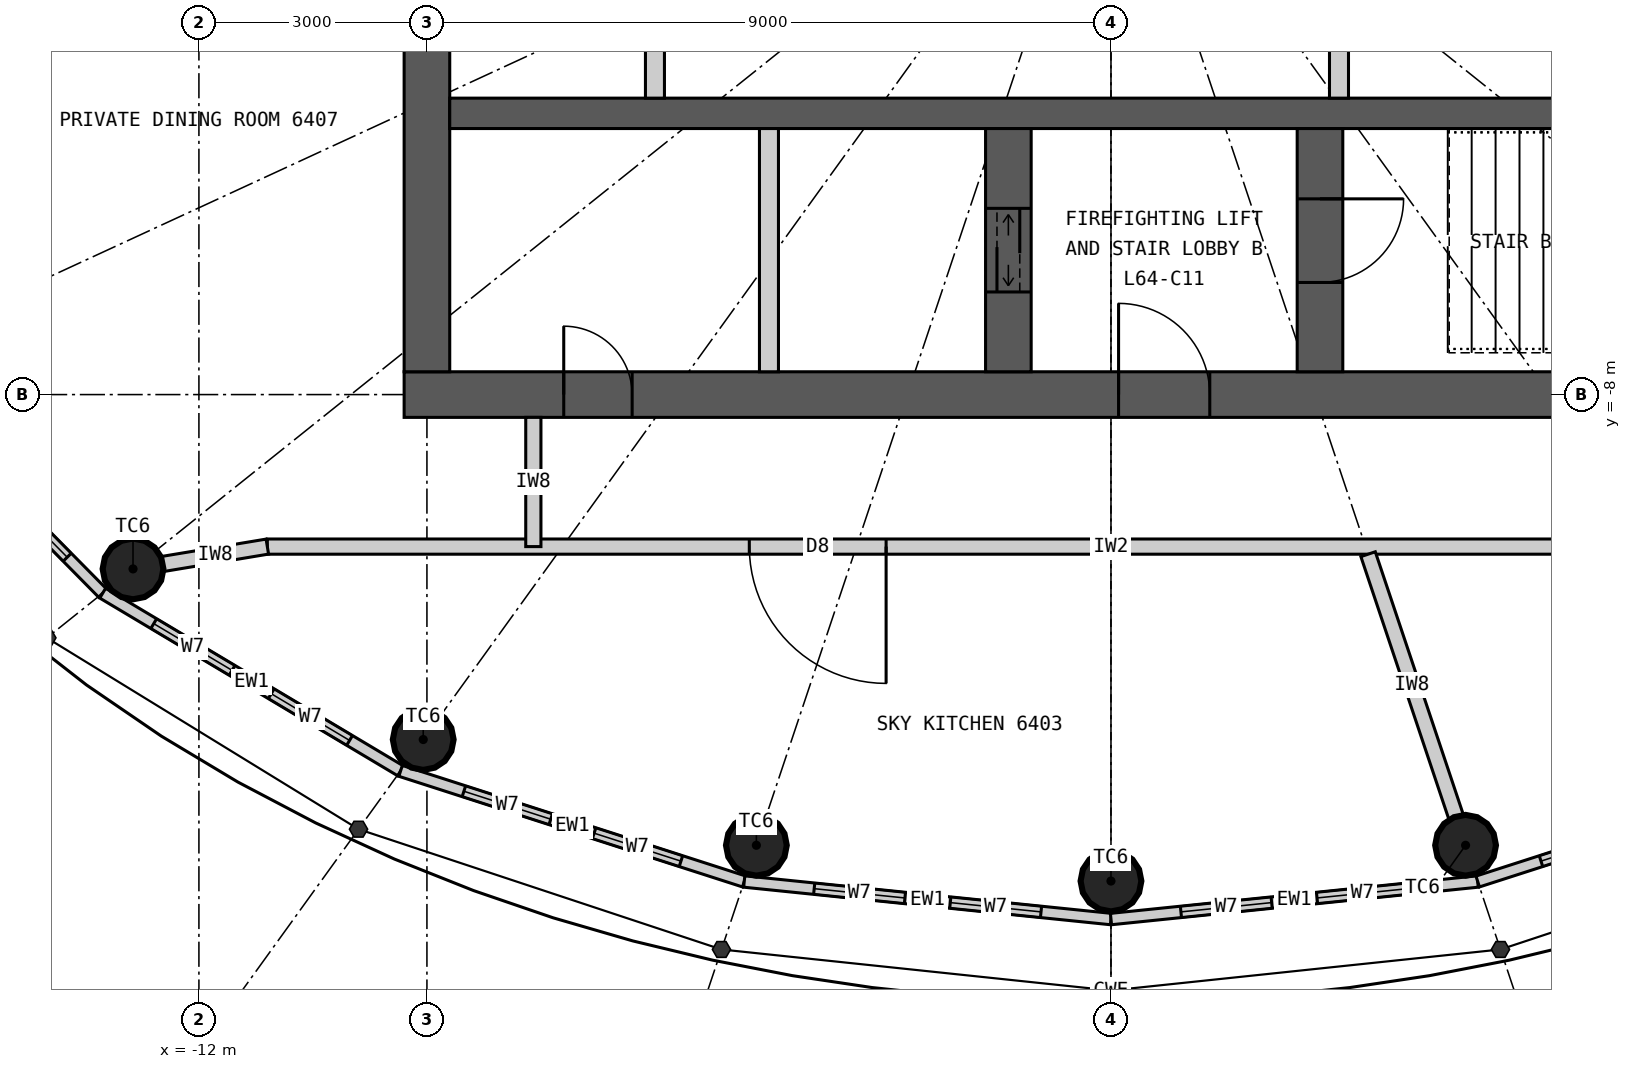
"""IFC4 building model, lengths in metres.
Left out: names, types, materials, properties, quantities, classifications, styles, units other than length and angle.
Written with IfcOpenShell. Run it as: python <this file> out.ifc"""

import sys

from ifc_helpers import new_model, si_unit, direction, frame, frame_2d, origin, origin_2d, place, context, subcontext, project, spatial, rectangle, circle, extrude, element, fill, save


model = new_model("IFC4")
c1 = context("Model", 3, precision=1e-05, world=origin(), true_north=direction((0.0, 1.0)))
c2 = subcontext(c1, "Body", "Model", "MODEL_VIEW")
j1 = project(units=[si_unit("LENGTHUNIT", "METRE"), si_unit("PLANEANGLEUNIT", "RADIAN")], contexts=[c1])
p1 = place(None, origin())
s1 = spatial("IfcSite", under=j1, at=p1, CompositionType="ELEMENT")
p2 = place(p1, origin())
s2 = spatial("IfcBuilding", under=s1, at=p2, CompositionType="ELEMENT")
p3 = place(p2, frame((0.0, 0.0, 237.3)))
s3 = spatial("IfcBuildingStorey", under=s2, at=p3, CompositionType="ELEMENT", Elevation=237.3)
for number, where, z_axis, x_axis in (
    (1, (-12.867, -10.294, 0.0), (0.0, 0.0, 1.0), (1.0, 0.0, 0.0)),
    (2, (-9.049, -12.538, 0.0), (0.0, 0.0, 1.0), (1.0, 0.0, 0.0)),
    (3, (-4.666, -13.929, 0.0), (0.0, 0.0, 1.0), (1.0, 0.0, 0.0)),
    (4, (0.0, -14.4, 0.0), (0.0, 0.0, 1.0), (1.0, 0.0, 0.0)),
    (5, (4.666, -13.929, 0.0), (0.0, 0.0, 1.0), (1.0, 0.0, 0.0)),
):
    element("IfcColumn", number, at=place(p3, frame(where, z_axis=z_axis, x_axis=x_axis)), inside=s3, PredefinedType="COLUMN", context=c2, shape_type="SweptSolid", body=[
        extrude(circle(Radius=0.4, at=origin_2d()), origin(), (0.0, 0.0, 1.0), 5.4),
    ])
p4 = place(p3, frame((9.3, -8.0, 0.0), z_axis=(0.0, 0.0, 1.0), x_axis=(-1.0, 0.0, 0.0)))
e6 = element("IfcWall", 6, at=p4, inside=s3, PredefinedType="SHEAR", context=c2, shape_type="SweptSolid", body=[
    extrude(rectangle(XDim=18.6, YDim=0.6, at=frame_2d((9.3, 0.0))), origin(), (0.0, 0.0, 1.0), 5.4),
])
p5 = place(p4, frame((8.0, 0.0, 0.0)))
e7 = element("IfcOpeningElement", 7, at=p5, cuts=e6, PredefinedType="OPENING", context=c2, shape_type="SweptSolid", body=[
    extrude(rectangle(XDim=1.2, YDim=2.2, at=frame_2d((0.6, 1.1))), frame((0.0, 0.31, 0.0), z_axis=(0.0, -1.0, 0.0), x_axis=(1.0, 0.0, 0.0)), (0.0, 0.0, 1.0), 0.62),
])
p6 = place(p4, frame((15.6, 0.0, 0.0)))
e8 = element("IfcOpeningElement", 8, at=p6, cuts=e6, PredefinedType="OPENING", context=c2, shape_type="SweptSolid", body=[
    extrude(rectangle(XDim=0.9, YDim=2.2, at=frame_2d((0.45, 1.1))), frame((0.0, 0.31, 0.0), z_axis=(0.0, -1.0, 0.0), x_axis=(1.0, 0.0, 0.0)), (0.0, 0.0, 1.0), 0.62),
])
p7 = place(p3, frame((-9.0, 7.7, 0.0), z_axis=(0.0, 0.0, 1.0), x_axis=(0.0, -1.0, 0.0)))
e9 = element("IfcWall", 9, at=p7, inside=s3, PredefinedType="SHEAR", context=c2, shape_type="SweptSolid", body=[
    extrude(rectangle(XDim=15.4, YDim=0.6, at=frame_2d((7.7, 0.0))), origin(), (0.0, 0.0, 1.0), 5.4),
])
p8 = place(p7, frame((6.8, 0.0, 0.0)))
e10 = element("IfcOpeningElement", 10, at=p8, cuts=e9, PredefinedType="OPENING", context=c2, shape_type="SweptSolid", body=[
    extrude(rectangle(XDim=1.8, YDim=2.2, at=frame_2d((0.9, 1.1))), frame((0.0, 0.31, 0.0), z_axis=(0.0, -1.0, 0.0), x_axis=(1.0, 0.0, 0.0)), (0.0, 0.0, 1.0), 0.62),
])
p9 = place(p3, frame((-8.7, -4.3, 0.0), z_axis=(0.0, 0.0, 1.0), x_axis=(1.0, 0.0, 0.0)))
e11 = element("IfcWall", 11, at=p9, inside=s3, PredefinedType="SHEAR", context=c2, shape_type="SweptSolid", body=[
    extrude(rectangle(XDim=17.4, YDim=0.4, at=frame_2d((8.7, 0.0))), origin(), (0.0, 0.0, 1.0), 5.4),
])
p10 = place(p3, frame((2.75, -7.7, 0.0), z_axis=(0.0, 0.0, 1.0), x_axis=(0.0, 1.0, 0.0)))
e12 = element("IfcWall", 12, at=p10, inside=s3, PredefinedType="SHEAR", context=c2, shape_type="SweptSolid", body=[
    extrude(rectangle(XDim=3.2, YDim=0.6, at=frame_2d((1.6, 0.0))), origin(), (0.0, 0.0, 1.0), 5.4),
])
p11 = place(p10, frame((1.175, 0.0, 0.0)))
e13 = element("IfcOpeningElement", 13, at=p11, cuts=e12, PredefinedType="OPENING", context=c2, shape_type="SweptSolid", body=[
    extrude(rectangle(XDim=1.1, YDim=2.2, at=frame_2d((0.55, 1.1))), frame((0.0, 0.31, 0.0), z_axis=(0.0, -1.0, 0.0), x_axis=(1.0, 0.0, 0.0)), (0.0, 0.0, 1.0), 0.62),
])
p12 = place(p3, frame((-1.35, -7.7, 0.0), z_axis=(0.0, 0.0, 1.0), x_axis=(0.0, 1.0, 0.0)))
e14 = element("IfcWall", 14, at=p12, inside=s3, PredefinedType="SHEAR", context=c2, shape_type="SweptSolid", body=[
    extrude(rectangle(XDim=3.2, YDim=0.6, at=frame_2d((1.6, 0.0))), origin(), (0.0, 0.0, 1.0), 5.4),
])
p13 = place(p12, frame((1.05, 0.0, 0.0)))
e15 = element("IfcOpeningElement", 15, at=p13, cuts=e14, PredefinedType="OPENING", context=c2, shape_type="SweptSolid", body=[
    extrude(rectangle(XDim=1.1, YDim=2.2, at=frame_2d((0.55, 1.1))), frame((0.0, 0.31, 0.0), z_axis=(0.0, -1.0, 0.0), x_axis=(1.0, 0.0, 0.0)), (0.0, 0.0, 1.0), 0.62),
])
p14 = place(p3, frame((-4.5, -7.7, 0.0), z_axis=(0.0, 0.0, 1.0), x_axis=(0.0, 1.0, 0.0)))
e16 = element("IfcWall", 16, at=p14, inside=s3, PredefinedType="PARTITIONING", context=c2, shape_type="SweptSolid", body=[
    extrude(rectangle(XDim=3.2, YDim=0.25, at=frame_2d((1.6, 0.0))), origin(), (0.0, 0.0, 1.0), 5.4),
])
for number, where, z_axis, x_axis in (
    (17, (-6.0, -4.1, 0.0), (0.0, 0.0, 1.0), (0.0, 1.0, 0.0)),
    (18, (3.0, -4.1, 0.0), (0.0, 0.0, 1.0), (0.0, 1.0, 0.0)),
):
    element("IfcWall", number, at=place(p3, frame(where, z_axis=z_axis, x_axis=x_axis)), inside=s3, PredefinedType="PARTITIONING", context=c2, shape_type="SweptSolid", body=[
        extrude(rectangle(XDim=2.35, YDim=0.25, at=frame_2d((1.175, 0.0))), origin(), (0.0, 0.0, 1.0), 5.4),
    ])
p15 = place(p3, frame((-16.307, -7.532, 0.0), z_axis=(0.0, 0.0, 1.0), x_axis=(0.702523956258, -0.711660095048, 0.0)))
e19 = element("IfcWall", 19, at=p15, inside=s3, PredefinedType="ELEMENTEDWALL", context=c2, shape_type="SweptSolid", body=[
    extrude(rectangle(XDim=4.329, YDim=0.15, at=frame_2d((2.165, 0.0))), origin(), (0.0, 0.0, 1.0), 5.15),
])
p16 = place(p15, frame((0.665, 0.0, 0.5)))
e20 = element("IfcOpeningElement", 20, at=p16, cuts=e19, PredefinedType="OPENING", context=c2, shape_type="SweptSolid", body=[
    extrude(rectangle(XDim=1.2, YDim=3.6, at=frame_2d((0.6, 1.8))), frame((0.0, 0.085, 0.0), z_axis=(0.0, -1.0, 0.0), x_axis=(1.0, 0.0, 0.0)), (0.0, 0.0, 1.0), 0.17),
])
p17 = place(p15, frame((2.465, 0.0, 0.5)))
e21 = element("IfcOpeningElement", 21, at=p17, cuts=e19, PredefinedType="OPENING", context=c2, shape_type="SweptSolid", body=[
    extrude(rectangle(XDim=1.2, YDim=3.6, at=frame_2d((0.6, 1.8))), frame((0.0, 0.085, 0.0), z_axis=(0.0, -1.0, 0.0), x_axis=(1.0, 0.0, 0.0)), (0.0, 0.0, 1.0), 0.17),
])
p18 = place(p3, frame((-13.266, -10.613, 0.0), z_axis=(0.0, 0.0, 1.0), x_axis=(0.858849230109, -0.512228464594, 0.0)))
e22 = element("IfcWall", 22, at=p18, inside=s3, PredefinedType="ELEMENTEDWALL", context=c2, shape_type="SweptSolid", body=[
    extrude(rectangle(XDim=4.564, YDim=0.15, at=frame_2d((2.282, 0.0))), origin(), (0.0, 0.0, 1.0), 5.15),
])
p19 = place(p18, frame((0.782, 0.0, 0.5)))
e23 = element("IfcOpeningElement", 23, at=p19, cuts=e22, PredefinedType="OPENING", context=c2, shape_type="SweptSolid", body=[
    extrude(rectangle(XDim=1.2, YDim=3.6, at=frame_2d((0.6, 1.8))), frame((0.0, 0.085, 0.0), z_axis=(0.0, -1.0, 0.0), x_axis=(1.0, 0.0, 0.0)), (0.0, 0.0, 1.0), 0.17),
])
p20 = place(p18, frame((2.582, 0.0, 0.5)))
e24 = element("IfcOpeningElement", 24, at=p20, cuts=e22, PredefinedType="OPENING", context=c2, shape_type="SweptSolid", body=[
    extrude(rectangle(XDim=1.2, YDim=3.6, at=frame_2d((0.6, 1.8))), frame((0.0, 0.085, 0.0), z_axis=(0.0, -1.0, 0.0), x_axis=(1.0, 0.0, 0.0)), (0.0, 0.0, 1.0), 0.17),
])
p21 = place(p3, frame((-9.346, -12.951, 0.0), z_axis=(0.0, 0.0, 1.0), x_axis=(0.951881908824, -0.306465057804, 0.0)))
e25 = element("IfcWall", 25, at=p21, inside=s3, PredefinedType="ELEMENTEDWALL", context=c2, shape_type="SweptSolid", body=[
    extrude(rectangle(XDim=4.75, YDim=0.15, at=frame_2d((2.375, 0.0))), origin(), (0.0, 0.0, 1.0), 5.15),
])
p22 = place(p21, frame((0.875, 0.0, 0.5)))
e26 = element("IfcOpeningElement", 26, at=p22, cuts=e25, PredefinedType="OPENING", context=c2, shape_type="SweptSolid", body=[
    extrude(rectangle(XDim=1.2, YDim=3.6, at=frame_2d((0.6, 1.8))), frame((0.0, 0.085, 0.0), z_axis=(0.0, -1.0, 0.0), x_axis=(1.0, 0.0, 0.0)), (0.0, 0.0, 1.0), 0.17),
])
p23 = place(p21, frame((2.675, 0.0, 0.5)))
e27 = element("IfcOpeningElement", 27, at=p23, cuts=e25, PredefinedType="OPENING", context=c2, shape_type="SweptSolid", body=[
    extrude(rectangle(XDim=1.2, YDim=3.6, at=frame_2d((0.6, 1.8))), frame((0.0, 0.085, 0.0), z_axis=(0.0, -1.0, 0.0), x_axis=(1.0, 0.0, 0.0)), (0.0, 0.0, 1.0), 0.17),
])
p24 = place(p3, frame((-4.825, -14.406, 0.0), z_axis=(0.0, 0.0, 1.0), x_axis=(0.994807343212, -0.10177597895, 0.0)))
e28 = element("IfcWall", 28, at=p24, inside=s3, PredefinedType="ELEMENTEDWALL", context=c2, shape_type="SweptSolid", body=[
    extrude(rectangle(XDim=4.85, YDim=0.15, at=frame_2d((2.425, 0.0))), origin(), (0.0, 0.0, 1.0), 5.15),
])
p25 = place(p24, frame((0.925, 0.0, 0.5)))
e29 = element("IfcOpeningElement", 29, at=p25, cuts=e28, PredefinedType="OPENING", context=c2, shape_type="SweptSolid", body=[
    extrude(rectangle(XDim=1.2, YDim=3.6, at=frame_2d((0.6, 1.8))), frame((0.0, 0.085, 0.0), z_axis=(0.0, -1.0, 0.0), x_axis=(1.0, 0.0, 0.0)), (0.0, 0.0, 1.0), 0.17),
])
p26 = place(p24, frame((2.725, 0.0, 0.5)))
e30 = element("IfcOpeningElement", 30, at=p26, cuts=e28, PredefinedType="OPENING", context=c2, shape_type="SweptSolid", body=[
    extrude(rectangle(XDim=1.2, YDim=3.6, at=frame_2d((0.6, 1.8))), frame((0.0, 0.085, 0.0), z_axis=(0.0, -1.0, 0.0), x_axis=(1.0, 0.0, 0.0)), (0.0, 0.0, 1.0), 0.17),
])
p27 = place(p3, frame((0.0, -14.9, 0.0), z_axis=(0.0, 0.0, 1.0), x_axis=(0.994807343212, 0.10177597895, 0.0)))
e31 = element("IfcWall", 31, at=p27, inside=s3, PredefinedType="ELEMENTEDWALL", context=c2, shape_type="SweptSolid", body=[
    extrude(rectangle(XDim=4.85, YDim=0.15, at=frame_2d((2.425, 0.0))), origin(), (0.0, 0.0, 1.0), 5.15),
])
p28 = place(p27, frame((0.925, 0.0, 0.5)))
e32 = element("IfcOpeningElement", 32, at=p28, cuts=e31, PredefinedType="OPENING", context=c2, shape_type="SweptSolid", body=[
    extrude(rectangle(XDim=1.2, YDim=3.6, at=frame_2d((0.6, 1.8))), frame((0.0, 0.085, 0.0), z_axis=(0.0, -1.0, 0.0), x_axis=(1.0, 0.0, 0.0)), (0.0, 0.0, 1.0), 0.17),
])
p29 = place(p27, frame((2.725, 0.0, 0.5)))
e33 = element("IfcOpeningElement", 33, at=p29, cuts=e31, PredefinedType="OPENING", context=c2, shape_type="SweptSolid", body=[
    extrude(rectangle(XDim=1.2, YDim=3.6, at=frame_2d((0.6, 1.8))), frame((0.0, 0.085, 0.0), z_axis=(0.0, -1.0, 0.0), x_axis=(1.0, 0.0, 0.0)), (0.0, 0.0, 1.0), 0.17),
])
p30 = place(p3, frame((4.825, -14.406, 0.0), z_axis=(0.0, 0.0, 1.0), x_axis=(0.951881908824, 0.306465057804, 0.0)))
e34 = element("IfcWall", 34, at=p30, inside=s3, PredefinedType="ELEMENTEDWALL", context=c2, shape_type="SweptSolid", body=[
    extrude(rectangle(XDim=4.75, YDim=0.15, at=frame_2d((2.375, 0.0))), origin(), (0.0, 0.0, 1.0), 5.15),
])
p31 = place(p30, frame((0.875, 0.0, 0.5)))
e35 = element("IfcOpeningElement", 35, at=p31, cuts=e34, PredefinedType="OPENING", context=c2, shape_type="SweptSolid", body=[
    extrude(rectangle(XDim=1.2, YDim=3.6, at=frame_2d((0.6, 1.8))), frame((0.0, 0.085, 0.0), z_axis=(0.0, -1.0, 0.0), x_axis=(1.0, 0.0, 0.0)), (0.0, 0.0, 1.0), 0.17),
])
p32 = place(p30, frame((2.675, 0.0, 0.5)))
e36 = element("IfcOpeningElement", 36, at=p32, cuts=e34, PredefinedType="OPENING", context=c2, shape_type="SweptSolid", body=[
    extrude(rectangle(XDim=1.2, YDim=3.6, at=frame_2d((0.6, 1.8))), frame((0.0, 0.085, 0.0), z_axis=(0.0, -1.0, 0.0), x_axis=(1.0, 0.0, 0.0)), (0.0, 0.0, 1.0), 0.17),
])
p33 = place(p3, frame((11.1, -10.0, 0.0), z_axis=(0.0, 0.0, 1.0), x_axis=(-1.0, 0.0, 0.0)))
e37 = element("IfcWall", 37, at=p33, inside=s3, PredefinedType="PARTITIONING", context=c2, shape_type="SweptSolid", body=[
    extrude(rectangle(XDim=22.2, YDim=0.2, at=frame_2d((11.1, 0.0))), origin(), (0.0, 0.0, 1.0), 5.15),
])
p34 = place(p33, frame((14.059, 0.0, 0.0)))
e38 = element("IfcOpeningElement", 38, at=p34, cuts=e37, PredefinedType="OPENING", context=c2, shape_type="SweptSolid", body=[
    extrude(rectangle(XDim=1.8, YDim=2.4, at=frame_2d((0.9, 1.2))), frame((0.0, 0.11, 0.0), z_axis=(0.0, -1.0, 0.0), x_axis=(1.0, 0.0, 0.0)), (0.0, 0.0, 1.0), 0.22),
])
p35 = place(p3, frame((3.383, -10.1, 0.0), z_axis=(0.0, 0.0, 1.0), x_axis=(0.317596328658, -0.948226013155, 0.0)))
e39 = element("IfcWall", 39, at=p35, inside=s3, PredefinedType="PARTITIONING", context=c2, shape_type="SweptSolid", body=[
    extrude(rectangle(XDim=3.638, YDim=0.2, at=frame_2d((1.819, 0.0))), origin(), (0.0, 0.0, 1.0), 4.3),
])
p36 = place(p3, frame((-7.6, -8.3, 0.0), z_axis=(0.0, 0.0, 1.0), x_axis=(0.0, -1.0, 0.0)))
e40 = element("IfcWall", 40, at=p36, inside=s3, PredefinedType="PARTITIONING", context=c2, shape_type="SweptSolid", body=[
    extrude(rectangle(XDim=1.7, YDim=0.2, at=frame_2d((0.85, 0.0))), origin(), (0.0, 0.0, 1.0), 5.15),
])
p37 = place(p3, frame((-11.1, -10.0, 0.0), z_axis=(0.0, 0.0, 1.0), x_axis=(-0.986474439415, -0.163915162144, 0.0)))
e41 = element("IfcWall", 41, at=p37, inside=s3, PredefinedType="PARTITIONING", context=c2, shape_type="SweptSolid", body=[
    extrude(rectangle(XDim=1.391, YDim=0.2, at=frame_2d((0.696, 0.0))), origin(), (0.0, 0.0, 1.0), 4.3),
])
p38 = place(p17, origin())
e42 = element("IfcWindow", 42, at=p38, inside=s3, PartitioningType="SINGLE_PANEL", PredefinedType="WINDOW", context=c2, shape_type="SweptSolid", body=[
    extrude(rectangle(XDim=1.2, YDim=3.6, at=frame_2d((0.6, 1.8))), frame((0.0, 0.03, 0.0), z_axis=(0.0, -1.0, 0.0), x_axis=(1.0, 0.0, 0.0)), (0.0, 0.0, 1.0), 0.06),
])
fill(e21, e42)
p39 = place(p19, origin())
e43 = element("IfcWindow", 43, at=p39, inside=s3, PartitioningType="SINGLE_PANEL", PredefinedType="WINDOW", context=c2, shape_type="SweptSolid", body=[
    extrude(rectangle(XDim=1.2, YDim=3.6, at=frame_2d((0.6, 1.8))), frame((0.0, 0.03, 0.0), z_axis=(0.0, -1.0, 0.0), x_axis=(1.0, 0.0, 0.0)), (0.0, 0.0, 1.0), 0.06),
])
fill(e23, e43)
p40 = place(p20, origin())
e44 = element("IfcWindow", 44, at=p40, inside=s3, PartitioningType="SINGLE_PANEL", PredefinedType="WINDOW", context=c2, shape_type="SweptSolid", body=[
    extrude(rectangle(XDim=1.2, YDim=3.6, at=frame_2d((0.6, 1.8))), frame((0.0, 0.03, 0.0), z_axis=(0.0, -1.0, 0.0), x_axis=(1.0, 0.0, 0.0)), (0.0, 0.0, 1.0), 0.06),
])
fill(e24, e44)
p41 = place(p22, origin())
e45 = element("IfcWindow", 45, at=p41, inside=s3, PartitioningType="SINGLE_PANEL", PredefinedType="WINDOW", context=c2, shape_type="SweptSolid", body=[
    extrude(rectangle(XDim=1.2, YDim=3.6, at=frame_2d((0.6, 1.8))), frame((0.0, 0.03, 0.0), z_axis=(0.0, -1.0, 0.0), x_axis=(1.0, 0.0, 0.0)), (0.0, 0.0, 1.0), 0.06),
])
fill(e26, e45)
p42 = place(p23, origin())
e46 = element("IfcWindow", 46, at=p42, inside=s3, PartitioningType="SINGLE_PANEL", PredefinedType="WINDOW", context=c2, shape_type="SweptSolid", body=[
    extrude(rectangle(XDim=1.2, YDim=3.6, at=frame_2d((0.6, 1.8))), frame((0.0, 0.03, 0.0), z_axis=(0.0, -1.0, 0.0), x_axis=(1.0, 0.0, 0.0)), (0.0, 0.0, 1.0), 0.06),
])
fill(e27, e46)
p43 = place(p25, origin())
e47 = element("IfcWindow", 47, at=p43, inside=s3, PartitioningType="SINGLE_PANEL", PredefinedType="WINDOW", context=c2, shape_type="SweptSolid", body=[
    extrude(rectangle(XDim=1.2, YDim=3.6, at=frame_2d((0.6, 1.8))), frame((0.0, 0.03, 0.0), z_axis=(0.0, -1.0, 0.0), x_axis=(1.0, 0.0, 0.0)), (0.0, 0.0, 1.0), 0.06),
])
fill(e29, e47)
p44 = place(p26, origin())
e48 = element("IfcWindow", 48, at=p44, inside=s3, PartitioningType="SINGLE_PANEL", PredefinedType="WINDOW", context=c2, shape_type="SweptSolid", body=[
    extrude(rectangle(XDim=1.2, YDim=3.6, at=frame_2d((0.6, 1.8))), frame((0.0, 0.03, 0.0), z_axis=(0.0, -1.0, 0.0), x_axis=(1.0, 0.0, 0.0)), (0.0, 0.0, 1.0), 0.06),
])
fill(e30, e48)
p45 = place(p28, origin())
e49 = element("IfcWindow", 49, at=p45, inside=s3, PartitioningType="SINGLE_PANEL", PredefinedType="WINDOW", context=c2, shape_type="SweptSolid", body=[
    extrude(rectangle(XDim=1.2, YDim=3.6, at=frame_2d((0.6, 1.8))), frame((0.0, 0.03, 0.0), z_axis=(0.0, -1.0, 0.0), x_axis=(1.0, 0.0, 0.0)), (0.0, 0.0, 1.0), 0.06),
])
fill(e32, e49)
p46 = place(p29, origin())
e50 = element("IfcWindow", 50, at=p46, inside=s3, PartitioningType="SINGLE_PANEL", PredefinedType="WINDOW", context=c2, shape_type="SweptSolid", body=[
    extrude(rectangle(XDim=1.2, YDim=3.6, at=frame_2d((0.6, 1.8))), frame((0.0, 0.03, 0.0), z_axis=(0.0, -1.0, 0.0), x_axis=(1.0, 0.0, 0.0)), (0.0, 0.0, 1.0), 0.06),
])
fill(e33, e50)
p47 = place(p31, origin())
e51 = element("IfcWindow", 51, at=p47, inside=s3, PartitioningType="SINGLE_PANEL", PredefinedType="WINDOW", context=c2, shape_type="SweptSolid", body=[
    extrude(rectangle(XDim=1.2, YDim=3.6, at=frame_2d((0.6, 1.8))), frame((0.0, 0.03, 0.0), z_axis=(0.0, -1.0, 0.0), x_axis=(1.0, 0.0, 0.0)), (0.0, 0.0, 1.0), 0.06),
])
fill(e35, e51)
p48 = place(p34, origin())
e52 = element("IfcDoor", 52, at=p48, inside=s3, OperationType="DOUBLE_DOOR_DOUBLE_SWING", PredefinedType="DOOR", context=c2, shape_type="SweptSolid", body=[
    extrude(rectangle(XDim=1.8, YDim=2.4, at=frame_2d((0.9, 1.2))), frame((0.0, 0.025, 0.0), z_axis=(0.0, -1.0, 0.0), x_axis=(1.0, 0.0, 0.0)), (0.0, 0.0, 1.0), 0.05),
])
fill(e38, e52)
p49 = place(p5, origin())
e53 = element("IfcDoor", 53, at=p49, inside=s3, OperationType="SINGLE_SWING_RIGHT", PredefinedType="DOOR", context=c2, shape_type="SweptSolid", body=[
    extrude(rectangle(XDim=1.2, YDim=2.2, at=frame_2d((0.6, 1.1))), frame((0.0, 0.025, 0.0), z_axis=(0.0, -1.0, 0.0), x_axis=(1.0, 0.0, 0.0)), (0.0, 0.0, 1.0), 0.05),
])
fill(e7, e53)
p50 = place(p11, origin())
e54 = element("IfcDoor", 54, at=p50, inside=s3, OperationType="SINGLE_SWING_RIGHT", PredefinedType="DOOR", context=c2, shape_type="SweptSolid", body=[
    extrude(rectangle(XDim=1.1, YDim=2.2, at=frame_2d((0.55, 1.1))), frame((0.0, 0.025, 0.0), z_axis=(0.0, -1.0, 0.0), x_axis=(1.0, 0.0, 0.0)), (0.0, 0.0, 1.0), 0.05),
])
fill(e13, e54)
p51 = place(p13, origin())
e55 = element("IfcDoor", 55, at=p51, inside=s3, OperationType="DOUBLE_DOOR_SLIDING", PredefinedType="DOOR", context=c2, shape_type="SweptSolid", body=[
    extrude(rectangle(XDim=1.1, YDim=2.2, at=frame_2d((0.55, 1.1))), frame((0.0, 0.025, 0.0), z_axis=(0.0, -1.0, 0.0), x_axis=(1.0, 0.0, 0.0)), (0.0, 0.0, 1.0), 0.05),
])
fill(e15, e55)
p52 = place(p6, origin())
e56 = element("IfcDoor", 56, at=p52, inside=s3, OperationType="SINGLE_SWING_RIGHT", PredefinedType="DOOR", context=c2, shape_type="SweptSolid", body=[
    extrude(rectangle(XDim=0.9, YDim=2.2, at=frame_2d((0.45, 1.1))), frame((0.0, 0.025, 0.0), z_axis=(0.0, -1.0, 0.0), x_axis=(1.0, 0.0, 0.0)), (0.0, 0.0, 1.0), 0.05),
])
fill(e8, e56)
save(model, sys.argv[1])
